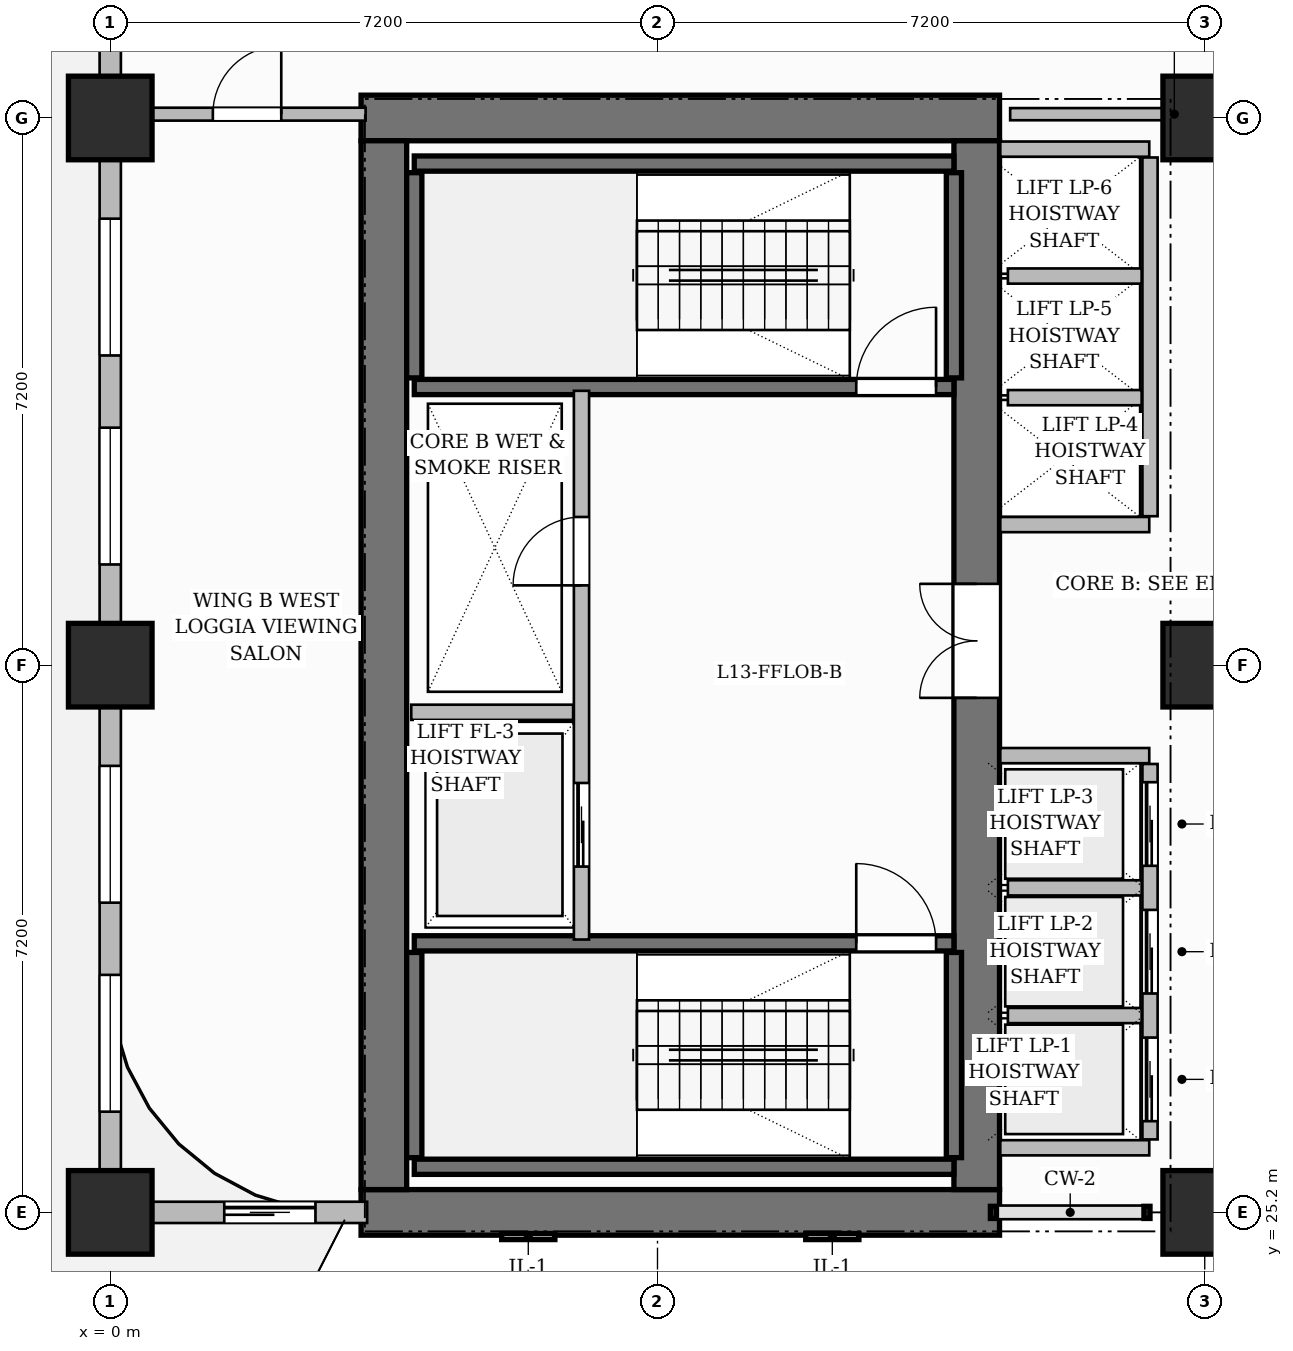
"""IFC4 building model, lengths in metres.
Left out: names, types, materials, properties, quantities, classifications, styles, units other than length and angle.
Written with IfcOpenShell. Run it as: python <this file> out.ifc"""

import sys

from ifc_helpers import new_model, si_unit, direction, frame, frame_2d, origin, origin_2d, place, context, subcontext, project, spatial, rectangle, extrude, source, transform, mapped, element, fill, save


model = new_model("IFC4")
c1 = context("Model", 3, precision=1e-05, world=origin(), true_north=direction((0.0, 1.0)))
c2 = subcontext(c1, "Body", "Model", "MODEL_VIEW")
j1 = project(units=[si_unit("LENGTHUNIT", "METRE"), si_unit("PLANEANGLEUNIT", "RADIAN")], contexts=[c1])
p1 = place(None, origin())
s1 = spatial("IfcSite", under=j1, at=p1, CompositionType="ELEMENT")
p2 = place(p1, origin())
s2 = spatial("IfcBuilding", under=s1, at=p2, CompositionType="ELEMENT")
p3 = place(p2, frame((0.0, 0.0, 58.3)))
s3 = spatial("IfcBuildingStorey", under=s2, at=p3, CompositionType="ELEMENT", Elevation=58.3)
for number, where, z_axis, x_axis in (
    (1, (3.3, 25.2, 0.0), (0.0, 0.0, 1.0), (1.0, 0.0, 0.0)),
    (2, (3.3, 39.6, 0.0), (0.0, 0.0, 1.0), (1.0, 0.0, 0.0)),
):
    element("IfcWall", number, at=place(p3, frame(where, z_axis=z_axis, x_axis=x_axis)), inside=s3, PredefinedType="SHEAR", context=c2, shape_type="SweptSolid", body=[
        extrude(rectangle(XDim=8.4, YDim=0.6, at=frame_2d((4.2, 0.0))), origin(), (0.0, 0.0, 1.0), 3.7),
    ])
p4 = place(p3, frame((3.6, 25.5, 0.0), z_axis=(0.0, 0.0, 1.0), x_axis=(0.0, 1.0, 0.0)))
e3 = element("IfcWall", 3, at=p4, inside=s3, PredefinedType="SHEAR", context=c2, shape_type="SweptSolid", body=[
    extrude(rectangle(XDim=13.8, YDim=0.6, at=frame_2d((6.9, 0.0))), origin(), (0.0, 0.0, 1.0), 3.7),
])
p5 = place(p3, frame((11.4, 25.5, 0.0), z_axis=(0.0, 0.0, 1.0), x_axis=(0.0, 1.0, 0.0)))
e4 = element("IfcWall", 4, at=p5, inside=s3, PredefinedType="SHEAR", context=c2, shape_type="SweptSolid", body=[
    extrude(rectangle(XDim=13.8, YDim=0.6, at=frame_2d((6.9, 0.0))), origin(), (0.0, 0.0, 1.0), 3.7),
])
p6 = place(p5, frame((6.47, 0.0, 0.0)))
e5 = element("IfcOpeningElement", 5, at=p6, cuts=e4, PredefinedType="OPENING", context=c2, shape_type="SweptSolid", body=[
    extrude(rectangle(XDim=1.5, YDim=2.2, at=frame_2d((0.75, 1.1))), frame((0.0, 0.31, 0.0), z_axis=(0.0, -1.0, 0.0), x_axis=(1.0, 0.0, 0.0)), (0.0, 0.0, 1.0), 0.62),
])
m1 = source(origin(), c2, "Body", "SweptSolid", [
    extrude(rectangle(XDim=1.1, YDim=1.1, at=origin_2d()), origin(), (0.0, 0.0, 1.0), 3.7),
])
for number, where, z_axis, x_axis in (
    (6, (0.0, 25.2, 0.0), (0.0, 0.0, 1.0), (1.0, 0.0, 0.0)),
    (7, (0.0, 32.4, 0.0), (0.0, 0.0, 1.0), (1.0, 0.0, 0.0)),
    (8, (0.0, 39.6, 0.0), (0.0, 0.0, 1.0), (1.0, 0.0, 0.0)),
    (9, (14.4, 25.2, 0.0), (0.0, 0.0, 1.0), (1.0, 0.0, 0.0)),
    (10, (14.4, 32.4, 0.0), (0.0, 0.0, 1.0), (1.0, 0.0, 0.0)),
    (11, (14.4, 39.6, 0.0), (0.0, 0.0, 1.0), (1.0, 0.0, 0.0)),
):
    element("IfcColumn", number, at=place(p3, frame(where, z_axis=z_axis, x_axis=x_axis)), inside=s3, PredefinedType="COLUMN", context=c2, shape_type="MappedRepresentation", body=[
        mapped(m1, transform((0.0, 0.0, 0.0), scale=1.0)),
    ])
p7 = place(p3, frame((4.0, 25.8, 0.0), z_axis=(0.0, 0.0, 1.0), x_axis=(1.0, 0.0, 0.0)))
e12 = element("IfcWall", 12, at=p7, inside=s3, PredefinedType="SHEAR", context=c2, shape_type="SweptSolid", body=[
    extrude(rectangle(XDim=7.1, YDim=0.2, at=frame_2d((3.55, 0.0))), origin(), (0.0, 0.0, 1.0), 3.7),
])
for number, where, z_axis, x_axis in (
    (13, (4.0, 25.92, 0.0), (0.0, 0.0, 1.0), (0.0, 1.0, 0.0)),
    (14, (11.1, 25.92, 0.0), (0.0, 0.0, 1.0), (0.0, 1.0, 0.0)),
):
    element("IfcWall", number, at=place(p3, frame(where, z_axis=z_axis, x_axis=x_axis)), inside=s3, PredefinedType="SHEAR", context=c2, shape_type="SweptSolid", body=[
        extrude(rectangle(XDim=2.7, YDim=0.2, at=frame_2d((1.35, 0.0))), origin(), (0.0, 0.0, 1.0), 3.7),
    ])
p8 = place(p3, frame((4.0, 28.74, 0.0), z_axis=(0.0, 0.0, 1.0), x_axis=(1.0, 0.0, 0.0)))
e15 = element("IfcWall", 15, at=p8, inside=s3, PredefinedType="SHEAR", context=c2, shape_type="SweptSolid", body=[
    extrude(rectangle(XDim=7.1, YDim=0.2, at=frame_2d((3.55, 0.0))), origin(), (0.0, 0.0, 1.0), 3.7),
])
p9 = place(p8, frame((5.815, 0.0, 0.0)))
e16 = element("IfcOpeningElement", 16, at=p9, cuts=e15, PredefinedType="OPENING", context=c2, shape_type="SweptSolid", body=[
    extrude(rectangle(XDim=1.05, YDim=2.2, at=frame_2d((0.525, 1.1))), frame((0.0, 0.11, 0.0), z_axis=(0.0, -1.0, 0.0), x_axis=(1.0, 0.0, 0.0)), (0.0, 0.0, 1.0), 0.22),
])
p10 = place(p3, frame((4.0, 39.0, 0.0), z_axis=(0.0, 0.0, 1.0), x_axis=(1.0, 0.0, 0.0)))
e17 = element("IfcWall", 17, at=p10, inside=s3, PredefinedType="SHEAR", context=c2, shape_type="SweptSolid", body=[
    extrude(rectangle(XDim=7.1, YDim=0.2, at=frame_2d((3.55, 0.0))), origin(), (0.0, 0.0, 1.0), 3.7),
])
for number, where, z_axis, x_axis in (
    (18, (4.0, 36.18, 0.0), (0.0, 0.0, 1.0), (0.0, 1.0, 0.0)),
    (19, (11.1, 36.18, 0.0), (0.0, 0.0, 1.0), (0.0, 1.0, 0.0)),
):
    element("IfcWall", number, at=place(p3, frame(where, z_axis=z_axis, x_axis=x_axis)), inside=s3, PredefinedType="SHEAR", context=c2, shape_type="SweptSolid", body=[
        extrude(rectangle(XDim=2.7, YDim=0.2, at=frame_2d((1.35, 0.0))), origin(), (0.0, 0.0, 1.0), 3.7),
    ])
p11 = place(p3, frame((4.0, 36.06, 0.0), z_axis=(0.0, 0.0, 1.0), x_axis=(1.0, 0.0, 0.0)))
e20 = element("IfcWall", 20, at=p11, inside=s3, PredefinedType="SHEAR", context=c2, shape_type="SweptSolid", body=[
    extrude(rectangle(XDim=7.1, YDim=0.2, at=frame_2d((3.55, 0.0))), origin(), (0.0, 0.0, 1.0), 3.7),
])
p12 = place(p11, frame((5.815, 0.0, 0.0)))
e21 = element("IfcOpeningElement", 21, at=p12, cuts=e20, PredefinedType="OPENING", context=c2, shape_type="SweptSolid", body=[
    extrude(rectangle(XDim=1.05, YDim=2.2, at=frame_2d((0.525, 1.1))), frame((0.0, 0.11, 0.0), z_axis=(0.0, -1.0, 0.0), x_axis=(1.0, 0.0, 0.0)), (0.0, 0.0, 1.0), 0.22),
])
p13 = place(p3, frame((6.2, 28.79, 0.0), z_axis=(0.0, 0.0, 1.0), x_axis=(0.0, 1.0, 0.0)))
e22 = element("IfcWall", 22, at=p13, inside=s3, PredefinedType="PARTITIONING", context=c2, shape_type="SweptSolid", body=[
    extrude(rectangle(XDim=7.22, YDim=0.2, at=frame_2d((3.61, 0.0))), origin(), (0.0, 0.0, 1.0), 3.45),
])
p14 = place(p13, frame((4.66, 0.0, 0.0)))
e23 = element("IfcOpeningElement", 23, at=p14, cuts=e22, PredefinedType="OPENING", context=c2, shape_type="SweptSolid", body=[
    extrude(rectangle(XDim=0.9, YDim=2.1, at=frame_2d((0.45, 1.05))), frame((0.0, 0.11, 0.0), z_axis=(0.0, -1.0, 0.0), x_axis=(1.0, 0.0, 0.0)), (0.0, 0.0, 1.0), 0.22),
])
p15 = place(p13, frame((0.96, 0.0, 0.0)))
e24 = element("IfcOpeningElement", 24, at=p15, cuts=e22, PredefinedType="OPENING", context=c2, shape_type="SweptSolid", body=[
    extrude(rectangle(XDim=1.1, YDim=2.2, at=frame_2d((0.55, 1.1))), frame((0.0, 0.11, 0.0), z_axis=(0.0, -1.0, 0.0), x_axis=(1.0, 0.0, 0.0)), (0.0, 0.0, 1.0), 0.22),
])
p16 = place(p3, frame((3.96, 31.78, 0.0), z_axis=(0.0, 0.0, 1.0), x_axis=(1.0, 0.0, 0.0)))
e25 = element("IfcWall", 25, at=p16, inside=s3, PredefinedType="PARTITIONING", context=c2, shape_type="SweptSolid", body=[
    extrude(rectangle(XDim=2.13, YDim=0.2, at=frame_2d((1.065, 0.0))), origin(), (0.0, 0.0, 1.0), 3.45),
])
for number, where, z_axis, x_axis in (
    (26, (11.71, 26.05, 0.0), (0.0, 0.0, 1.0), (1.0, 0.0, 0.0)),
    (27, (11.71, 31.21, 0.0), (0.0, 0.0, 1.0), (1.0, 0.0, 0.0)),
):
    element("IfcWall", number, at=place(p3, frame(where, z_axis=z_axis, x_axis=x_axis)), inside=s3, PredefinedType="PARTITIONING", context=c2, shape_type="SweptSolid", body=[
        extrude(rectangle(XDim=1.96, YDim=0.2, at=frame_2d((0.98, 0.0))), origin(), (0.0, 0.0, 1.0), 3.45),
    ])
p17 = place(p3, frame((13.68, 26.16, 0.0), z_axis=(0.0, 0.0, 1.0), x_axis=(0.0, 1.0, 0.0)))
e28 = element("IfcWall", 28, at=p17, inside=s3, PredefinedType="PARTITIONING", context=c2, shape_type="SweptSolid", body=[
    extrude(rectangle(XDim=4.94, YDim=0.2, at=frame_2d((2.47, 0.0))), origin(), (0.0, 0.0, 1.0), 3.45),
])
p18 = place(p17, frame((0.24, 0.0, 0.0)))
e29 = element("IfcOpeningElement", 29, at=p18, cuts=e28, PredefinedType="OPENING", context=c2, shape_type="SweptSolid", body=[
    extrude(rectangle(XDim=1.1, YDim=2.2, at=frame_2d((0.55, 1.1))), frame((0.0, 0.11, 0.0), z_axis=(0.0, -1.0, 0.0), x_axis=(1.0, 0.0, 0.0)), (0.0, 0.0, 1.0), 0.22),
])
p19 = place(p17, frame((1.92, 0.0, 0.0)))
e30 = element("IfcOpeningElement", 30, at=p19, cuts=e28, PredefinedType="OPENING", context=c2, shape_type="SweptSolid", body=[
    extrude(rectangle(XDim=1.1, YDim=2.2, at=frame_2d((0.55, 1.1))), frame((0.0, 0.11, 0.0), z_axis=(0.0, -1.0, 0.0), x_axis=(1.0, 0.0, 0.0)), (0.0, 0.0, 1.0), 0.22),
])
p20 = place(p17, frame((3.6, 0.0, 0.0)))
e31 = element("IfcOpeningElement", 31, at=p20, cuts=e28, PredefinedType="OPENING", context=c2, shape_type="SweptSolid", body=[
    extrude(rectangle(XDim=1.1, YDim=2.2, at=frame_2d((0.55, 1.1))), frame((0.0, 0.11, 0.0), z_axis=(0.0, -1.0, 0.0), x_axis=(1.0, 0.0, 0.0)), (0.0, 0.0, 1.0), 0.22),
])
for number, where, z_axis, x_axis in (
    (32, (11.81, 27.79, 0.0), (0.0, 0.0, 1.0), (1.0, 0.0, 0.0)),
    (33, (11.81, 29.47, 0.0), (0.0, 0.0, 1.0), (1.0, 0.0, 0.0)),
):
    element("IfcWall", number, at=place(p3, frame(where, z_axis=z_axis, x_axis=x_axis)), inside=s3, PredefinedType="PARTITIONING", context=c2, shape_type="SweptSolid", body=[
        extrude(rectangle(XDim=1.76, YDim=0.2, at=frame_2d((0.88, 0.0))), origin(), (0.0, 0.0, 1.0), 3.45),
    ])
for number, where, z_axis, x_axis in (
    (34, (11.71, 34.25, 0.0), (0.0, 0.0, 1.0), (1.0, 0.0, 0.0)),
    (35, (11.71, 39.19, 0.0), (0.0, 0.0, 1.0), (1.0, 0.0, 0.0)),
):
    element("IfcWall", number, at=place(p3, frame(where, z_axis=z_axis, x_axis=x_axis)), inside=s3, PredefinedType="PARTITIONING", context=c2, shape_type="SweptSolid", body=[
        extrude(rectangle(XDim=1.96, YDim=0.2, at=frame_2d((0.98, 0.0))), origin(), (0.0, 0.0, 1.0), 3.45),
    ])
p21 = place(p3, frame((13.68, 34.36, 0.0), z_axis=(0.0, 0.0, 1.0), x_axis=(0.0, 1.0, 0.0)))
e36 = element("IfcWall", 36, at=p21, inside=s3, PredefinedType="PARTITIONING", context=c2, shape_type="SweptSolid", body=[
    extrude(rectangle(XDim=4.72, YDim=0.2, at=frame_2d((2.36, 0.0))), origin(), (0.0, 0.0, 1.0), 3.45),
])
for number, where, z_axis, x_axis in (
    (37, (11.81, 35.92, 0.0), (0.0, 0.0, 1.0), (1.0, 0.0, 0.0)),
    (38, (11.81, 37.52, 0.0), (0.0, 0.0, 1.0), (1.0, 0.0, 0.0)),
):
    element("IfcWall", number, at=place(p3, frame(where, z_axis=z_axis, x_axis=x_axis)), inside=s3, PredefinedType="PARTITIONING", context=c2, shape_type="SweptSolid", body=[
        extrude(rectangle(XDim=1.76, YDim=0.2, at=frame_2d((0.88, 0.0))), origin(), (0.0, 0.0, 1.0), 3.45),
    ])
p22 = place(p3, frame((11.84, 39.65, 0.0), z_axis=(0.0, 0.0, 1.0), x_axis=(1.0, 0.0, 0.0)))
e39 = element("IfcWall", 39, at=p22, inside=s3, PredefinedType="PARTITIONING", context=c2, shape_type="SweptSolid", body=[
    extrude(rectangle(XDim=4.32, YDim=0.16, at=frame_2d((2.16, 0.0))), origin(), (0.0, 0.0, 1.0), 2.885),
])
p23 = place(p3, frame((0.24, 39.65, 0.0), z_axis=(0.0, 0.0, 1.0), x_axis=(1.0, 0.0, 0.0)))
e40 = element("IfcWall", 40, at=p23, inside=s3, PredefinedType="PARTITIONING", context=c2, shape_type="SweptSolid", body=[
    extrude(rectangle(XDim=3.12, YDim=0.17, at=frame_2d((1.56, 0.0))), origin(), (0.0, 0.0, 1.0), 3.45),
])
p24 = place(p23, frame((1.11, 0.0, 0.0)))
e41 = element("IfcOpeningElement", 41, at=p24, cuts=e40, PredefinedType="OPENING", context=c2, shape_type="SweptSolid", body=[
    extrude(rectangle(XDim=0.9, YDim=2.15, at=frame_2d((0.45, 1.075))), frame((0.0, 0.095, 0.0), z_axis=(0.0, -1.0, 0.0), x_axis=(1.0, 0.0, 0.0)), (0.0, 0.0, 1.0), 0.19),
])
p25 = place(p3, frame((0.0, 25.2, 0.0), z_axis=(0.0, 0.0, 1.0), x_axis=(1.0, 0.0, 0.0)))
e42 = element("IfcWall", 42, at=p25, inside=s3, PredefinedType="SOLIDWALL", context=c2, shape_type="SweptSolid", body=[
    extrude(rectangle(XDim=3.38, YDim=0.28, at=frame_2d((1.69, 0.0))), origin(), (0.0, 0.0, 1.0), 3.45),
])
p26 = place(p25, frame((1.5, 0.0, 0.0)))
e43 = element("IfcOpeningElement", 43, at=p26, cuts=e42, PredefinedType="OPENING", context=c2, shape_type="SweptSolid", body=[
    extrude(rectangle(XDim=1.2, YDim=2.2, at=frame_2d((0.6, 1.1))), frame((0.0, 0.15, 0.0), z_axis=(0.0, -1.0, 0.0), x_axis=(1.0, 0.0, 0.0)), (0.0, 0.0, 1.0), 0.3),
])
p27 = place(p3, frame((0.0, 25.25, 0.0), z_axis=(0.0, 0.0, 1.0), x_axis=(0.0, 1.0, 0.0)))
e44 = element("IfcWall", 44, at=p27, inside=s3, PredefinedType="SOLIDWALL", context=c2, shape_type="SweptSolid", body=[
    extrude(rectangle(XDim=21.5, YDim=0.28, at=frame_2d((10.75, 0.0))), origin(), (0.0, 0.0, 1.0), 2.885),
])
p28 = place(p27, frame((1.275, 0.0, 0.8)))
e45 = element("IfcOpeningElement", 45, at=p28, cuts=e44, PredefinedType="OPENING", context=c2, shape_type="SweptSolid", body=[
    extrude(rectangle(XDim=1.8, YDim=1.85, at=frame_2d((0.9, 0.925))), frame((0.0, 0.15, 0.0), z_axis=(0.0, -1.0, 0.0), x_axis=(1.0, 0.0, 0.0)), (0.0, 0.0, 1.0), 0.3),
])
p29 = place(p27, frame((4.025, 0.0, 0.8)))
e46 = element("IfcOpeningElement", 46, at=p29, cuts=e44, PredefinedType="OPENING", context=c2, shape_type="SweptSolid", body=[
    extrude(rectangle(XDim=1.8, YDim=1.85, at=frame_2d((0.9, 0.925))), frame((0.0, 0.15, 0.0), z_axis=(0.0, -1.0, 0.0), x_axis=(1.0, 0.0, 0.0)), (0.0, 0.0, 1.0), 0.3),
])
p30 = place(p27, frame((8.475, 0.0, 0.8)))
e47 = element("IfcOpeningElement", 47, at=p30, cuts=e44, PredefinedType="OPENING", context=c2, shape_type="SweptSolid", body=[
    extrude(rectangle(XDim=1.8, YDim=1.85, at=frame_2d((0.9, 0.925))), frame((0.0, 0.15, 0.0), z_axis=(0.0, -1.0, 0.0), x_axis=(1.0, 0.0, 0.0)), (0.0, 0.0, 1.0), 0.3),
])
p31 = place(p27, frame((11.225, 0.0, 0.8)))
e48 = element("IfcOpeningElement", 48, at=p31, cuts=e44, PredefinedType="OPENING", context=c2, shape_type="SweptSolid", body=[
    extrude(rectangle(XDim=1.8, YDim=1.85, at=frame_2d((0.9, 0.925))), frame((0.0, 0.15, 0.0), z_axis=(0.0, -1.0, 0.0), x_axis=(1.0, 0.0, 0.0)), (0.0, 0.0, 1.0), 0.3),
])
p32 = place(p27, frame((15.675, 0.0, 0.8)))
e49 = element("IfcOpeningElement", 49, at=p32, cuts=e44, PredefinedType="OPENING", context=c2, shape_type="SweptSolid", body=[
    extrude(rectangle(XDim=1.8, YDim=1.85, at=frame_2d((0.9, 0.925))), frame((0.0, 0.15, 0.0), z_axis=(0.0, -1.0, 0.0), x_axis=(1.0, 0.0, 0.0)), (0.0, 0.0, 1.0), 0.3),
])
p33 = place(p27, frame((18.425, 0.0, 0.8)))
e50 = element("IfcOpeningElement", 50, at=p33, cuts=e44, PredefinedType="OPENING", context=c2, shape_type="SweptSolid", body=[
    extrude(rectangle(XDim=1.8, YDim=1.85, at=frame_2d((0.9, 0.925))), frame((0.0, 0.15, 0.0), z_axis=(0.0, -1.0, 0.0), x_axis=(1.0, 0.0, 0.0)), (0.0, 0.0, 1.0), 0.3),
])
m2 = source(origin(), c2, "Body", "SweptSolid", [
    extrude(rectangle(XDim=1.05, YDim=2.2, at=frame_2d((0.525, 1.1))), frame((0.0, 0.025, 0.0), z_axis=(0.0, -1.0, 0.0), x_axis=(1.0, 0.0, 0.0)), (0.0, 0.0, 1.0), 0.05),
])
p34 = place(p9, origin())
e51 = element("IfcDoor", 51, at=p34, inside=s3, OperationType="SINGLE_SWING_LEFT", PredefinedType="DOOR", context=c2, shape_type="MappedRepresentation", body=[
    mapped(m2, transform((0.0, 0.0, 0.0), scale=1.0)),
])
fill(e16, e51)
p35 = place(p12, origin())
e52 = element("IfcDoor", 52, at=p35, inside=s3, OperationType="SINGLE_SWING_RIGHT", PredefinedType="DOOR", context=c2, shape_type="MappedRepresentation", body=[
    mapped(m2, transform((0.0, 0.0, 0.0), scale=1.0)),
])
fill(e21, e52)
m3 = source(origin(), c2, "Body", "SweptSolid", [
    extrude(rectangle(XDim=0.9, YDim=2.1, at=frame_2d((0.45, 1.05))), frame((0.0, 0.025, 0.0), z_axis=(0.0, -1.0, 0.0), x_axis=(1.0, 0.0, 0.0)), (0.0, 0.0, 1.0), 0.05),
])
p36 = place(p14, origin())
e53 = element("IfcDoor", 53, at=p36, inside=s3, OperationType="SINGLE_SWING_LEFT", PredefinedType="DOOR", context=c2, shape_type="MappedRepresentation", body=[
    mapped(m3, transform((0.0, 0.0, 0.0), scale=1.0)),
])
fill(e23, e53)
m4 = source(origin(), c2, "Body", "SweptSolid", [
    extrude(rectangle(XDim=1.5, YDim=2.2, at=frame_2d((0.75, 1.1))), frame((0.0, 0.025, 0.0), z_axis=(0.0, -1.0, 0.0), x_axis=(1.0, 0.0, 0.0)), (0.0, 0.0, 1.0), 0.05),
])
p37 = place(p6, origin())
e54 = element("IfcDoor", 54, at=p37, inside=s3, OperationType="DOUBLE_DOOR_SINGLE_SWING", PredefinedType="DOOR", context=c2, shape_type="MappedRepresentation", body=[
    mapped(m4, transform((0.0, 0.0, 0.0), scale=1.0)),
])
fill(e5, e54)
m5 = source(origin(), c2, "Body", "SweptSolid", [
    extrude(rectangle(XDim=0.9, YDim=2.15, at=frame_2d((0.45, 1.075))), frame((0.0, 0.025, 0.0), z_axis=(0.0, -1.0, 0.0), x_axis=(1.0, 0.0, 0.0)), (0.0, 0.0, 1.0), 0.05),
])
p38 = place(p24, origin())
e55 = element("IfcDoor", 55, at=p38, inside=s3, OperationType="SINGLE_SWING_RIGHT", PredefinedType="DOOR", context=c2, shape_type="MappedRepresentation", body=[
    mapped(m5, transform((0.0, 0.0, 0.0), scale=1.0)),
])
fill(e41, e55)
m6 = source(origin(), c2, "Body", "SweptSolid", [
    extrude(rectangle(XDim=1.1, YDim=2.2, at=frame_2d((0.55, 1.1))), frame((0.0, 0.025, 0.0), z_axis=(0.0, -1.0, 0.0), x_axis=(1.0, 0.0, 0.0)), (0.0, 0.0, 1.0), 0.05),
])
p39 = place(p15, origin())
e56 = element("IfcDoor", 56, at=p39, inside=s3, OperationType="SLIDING_TO_LEFT", PredefinedType="DOOR", context=c2, shape_type="MappedRepresentation", body=[
    mapped(m6, transform((0.0, 0.0, 0.0), scale=1.0)),
])
fill(e24, e56)
p40 = place(p18, origin())
e57 = element("IfcDoor", 57, at=p40, inside=s3, OperationType="SLIDING_TO_LEFT", PredefinedType="DOOR", context=c2, shape_type="MappedRepresentation", body=[
    mapped(m6, transform((0.0, 0.0, 0.0), scale=1.0)),
])
fill(e29, e57)
p41 = place(p19, origin())
e58 = element("IfcDoor", 58, at=p41, inside=s3, OperationType="SLIDING_TO_LEFT", PredefinedType="DOOR", context=c2, shape_type="MappedRepresentation", body=[
    mapped(m6, transform((0.0, 0.0, 0.0), scale=1.0)),
])
fill(e30, e58)
p42 = place(p20, origin())
e59 = element("IfcDoor", 59, at=p42, inside=s3, OperationType="SLIDING_TO_LEFT", PredefinedType="DOOR", context=c2, shape_type="MappedRepresentation", body=[
    mapped(m6, transform((0.0, 0.0, 0.0), scale=1.0)),
])
fill(e31, e59)
m7 = source(origin(), c2, "Body", "SweptSolid", [
    extrude(rectangle(XDim=1.2, YDim=2.2, at=frame_2d((0.6, 1.1))), frame((0.0, 0.025, 0.0), z_axis=(0.0, -1.0, 0.0), x_axis=(1.0, 0.0, 0.0)), (0.0, 0.0, 1.0), 0.05),
])
p43 = place(p26, origin())
e60 = element("IfcDoor", 60, at=p43, inside=s3, OperationType="SLIDING_TO_LEFT", PredefinedType="DOOR", context=c2, shape_type="MappedRepresentation", body=[
    mapped(m7, transform((0.0, 0.0, 0.0), scale=1.0)),
])
fill(e43, e60)
m8 = source(origin(), c2, "Body", "SweptSolid", [
    extrude(rectangle(XDim=1.8, YDim=1.85, at=frame_2d((0.9, 0.925))), frame((0.0, 0.03, 0.0), z_axis=(0.0, -1.0, 0.0), x_axis=(1.0, 0.0, 0.0)), (0.0, 0.0, 1.0), 0.06),
])
p44 = place(p28, origin())
e61 = element("IfcWindow", 61, at=p44, inside=s3, PartitioningType="DOUBLE_PANEL_VERTICAL", PredefinedType="WINDOW", context=c2, shape_type="MappedRepresentation", body=[
    mapped(m8, transform((0.0, 0.0, 0.0), scale=1.0)),
])
fill(e45, e61)
p45 = place(p29, origin())
e62 = element("IfcWindow", 62, at=p45, inside=s3, PartitioningType="DOUBLE_PANEL_VERTICAL", PredefinedType="WINDOW", context=c2, shape_type="MappedRepresentation", body=[
    mapped(m8, transform((0.0, 0.0, 0.0), scale=1.0)),
])
fill(e46, e62)
p46 = place(p30, origin())
e63 = element("IfcWindow", 63, at=p46, inside=s3, PartitioningType="DOUBLE_PANEL_VERTICAL", PredefinedType="WINDOW", context=c2, shape_type="MappedRepresentation", body=[
    mapped(m8, transform((0.0, 0.0, 0.0), scale=1.0)),
])
fill(e47, e63)
p47 = place(p31, origin())
e64 = element("IfcWindow", 64, at=p47, inside=s3, PartitioningType="DOUBLE_PANEL_VERTICAL", PredefinedType="WINDOW", context=c2, shape_type="MappedRepresentation", body=[
    mapped(m8, transform((0.0, 0.0, 0.0), scale=1.0)),
])
fill(e48, e64)
save(model, sys.argv[1])
